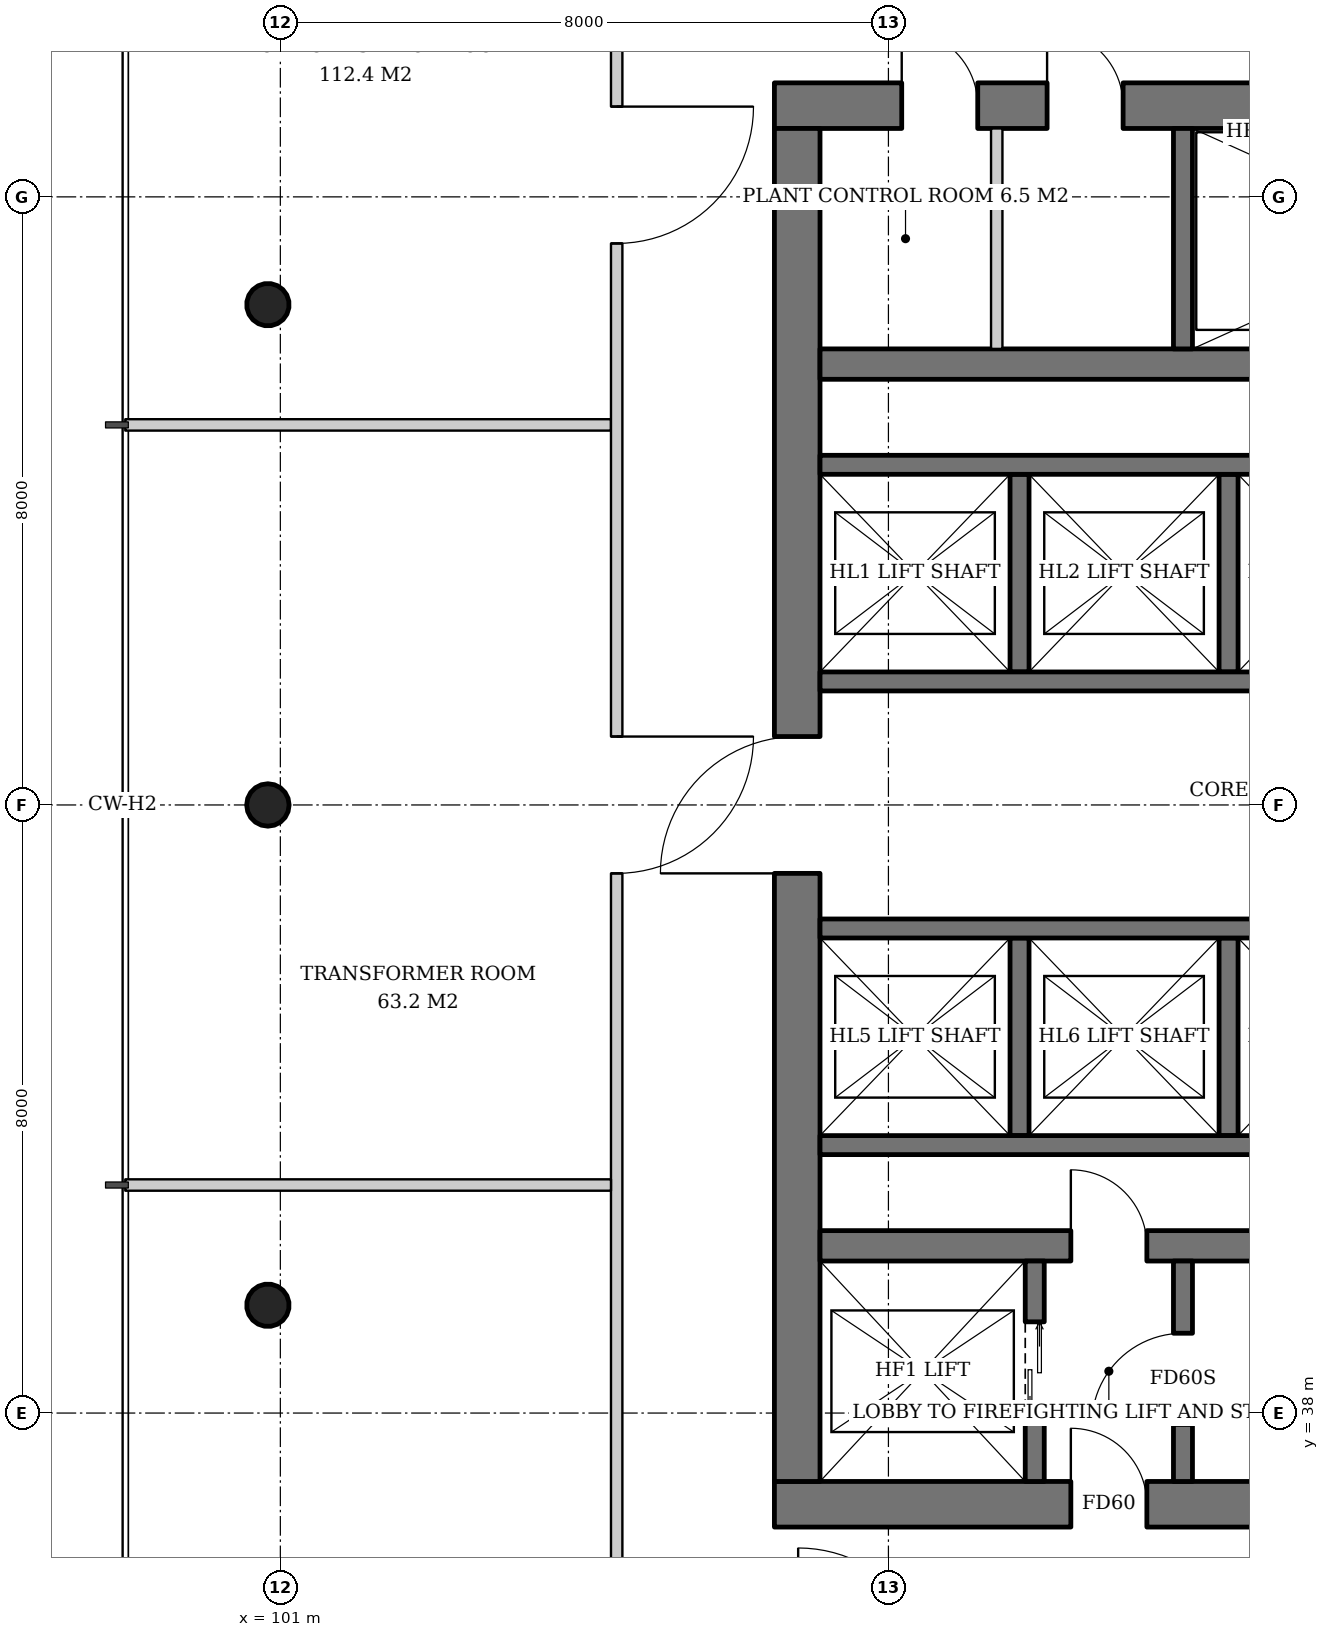
"""IFC4 building model, lengths in metres.
Left out: names, types, materials, properties, quantities, classifications, styles, units other than length and angle.
Written with IfcOpenShell. Run it as: python <this file> out.ifc"""

import sys

from ifc_helpers import new_model, si_unit, direction, frame, frame_2d, origin, origin_2d, place, context, subcontext, project, spatial, rectangle, hollow_circle, extrude, element, fill, save


model = new_model("IFC4")
c1 = context("Model", 3, precision=1e-05, world=origin(), true_north=direction((0.0, 1.0)))
c2 = subcontext(c1, "Body", "Model", "MODEL_VIEW")
j1 = project(units=[si_unit("LENGTHUNIT", "METRE"), si_unit("PLANEANGLEUNIT", "RADIAN")], contexts=[c1])
p1 = place(None, origin())
s1 = spatial("IfcSite", under=j1, at=p1, CompositionType="ELEMENT")
p2 = place(p1, origin())
s2 = spatial("IfcBuilding", under=s1, at=p2, CompositionType="ELEMENT")
p3 = place(p2, frame((0.0, 0.0, 85.6)))
s3 = spatial("IfcBuildingStorey", under=s2, at=p3, CompositionType="ELEMENT", Elevation=85.6)
p4 = place(p3, frame((100.784, 52.608, 0.0), z_axis=(0.04306234503, -0.02149908433, 0.998841040313), x_axis=(0.446680166538, 0.894693706707, 0.0)))
e1 = element("IfcColumn", 1, at=p4, inside=s3, PredefinedType="COLUMN", context=c2, shape_type="SweptSolid", body=[
    extrude(hollow_circle(Radius=0.28, WallThickness=0.02, at=origin_2d()), origin(), (0.0, 0.0, 1.0), 3.804),
])
p5 = place(p3, frame((100.784, 46.0, 0.0), z_axis=(0.043072300418, 0.0, 0.999071957837), x_axis=(0.0, 1.0, 0.0)))
e2 = element("IfcColumn", 2, at=p5, inside=s3, PredefinedType="COLUMN", context=c2, shape_type="SweptSolid", body=[
    extrude(hollow_circle(Radius=0.28, WallThickness=0.02, at=origin_2d()), origin(), (0.0, 0.0, 1.0), 3.803),
])
p6 = place(p3, frame((100.784, 39.392, 0.0), z_axis=(0.04306234503, 0.02149908433, 0.998841040313), x_axis=(-0.446680166538, 0.894693706707, 0.0)))
e3 = element("IfcColumn", 3, at=p6, inside=s3, PredefinedType="COLUMN", context=c2, shape_type="SweptSolid", body=[
    extrude(hollow_circle(Radius=0.28, WallThickness=0.02, at=origin_2d()), origin(), (0.0, 0.0, 1.0), 3.804),
])
p7 = place(p3, frame((107.5, 36.8, 0.0), z_axis=(0.0, 0.0, 1.0), x_axis=(1.0, 0.0, 0.0)))
e4 = element("IfcWall", 4, at=p7, inside=s3, PredefinedType="SHEAR", context=c2, shape_type="SweptSolid", body=[
    extrude(rectangle(XDim=19.0, YDim=0.6, at=frame_2d((9.5, 0.0))), origin(), (0.0, 0.0, 1.0), 3.8),
])
p8 = place(p7, frame((3.9, 0.0, 0.0)))
e5 = element("IfcOpeningElement", 5, at=p8, cuts=e4, PredefinedType="OPENING", context=c2, shape_type="SweptSolid", body=[
    extrude(rectangle(XDim=1.0, YDim=2.1, at=frame_2d((0.5, 1.05))), frame((0.0, 0.31, 0.0), z_axis=(0.0, -1.0, 0.0), x_axis=(1.0, 0.0, 0.0)), (0.0, 0.0, 1.0), 0.62),
])
p9 = place(p7, frame((15.615, 0.0, 0.0)))
e6 = element("IfcOpeningElement", 6, at=p9, cuts=e4, PredefinedType="OPENING", context=c2, shape_type="SweptSolid", body=[
    extrude(rectangle(XDim=1.0, YDim=2.1, at=frame_2d((0.5, 1.05))), frame((0.0, 0.31, 0.0), z_axis=(0.0, -1.0, 0.0), x_axis=(1.0, 0.0, 0.0)), (0.0, 0.0, 1.0), 0.62),
])
p10 = place(p3, frame((107.5, 55.2, 0.0), z_axis=(0.0, 0.0, 1.0), x_axis=(1.0, 0.0, 0.0)))
e7 = element("IfcWall", 7, at=p10, inside=s3, PredefinedType="SHEAR", context=c2, shape_type="SweptSolid", body=[
    extrude(rectangle(XDim=19.0, YDim=0.6, at=frame_2d((9.5, 0.0))), origin(), (0.0, 0.0, 1.0), 3.8),
])
p11 = place(p10, frame((14.14, 0.0, 0.0)))
e8 = element("IfcOpeningElement", 8, at=p11, cuts=e7, PredefinedType="OPENING", context=c2, shape_type="SweptSolid", body=[
    extrude(rectangle(XDim=1.0, YDim=2.1, at=frame_2d((0.5, 1.05))), frame((0.0, 0.31, 0.0), z_axis=(0.0, -1.0, 0.0), x_axis=(1.0, 0.0, 0.0)), (0.0, 0.0, 1.0), 0.62),
])
p12 = place(p10, frame((1.675, 0.0, 0.0)))
e9 = element("IfcOpeningElement", 9, at=p12, cuts=e7, PredefinedType="OPENING", context=c2, shape_type="SweptSolid", body=[
    extrude(rectangle(XDim=1.0, YDim=2.1, at=frame_2d((0.5, 1.05))), frame((0.0, 0.31, 0.0), z_axis=(0.0, -1.0, 0.0), x_axis=(1.0, 0.0, 0.0)), (0.0, 0.0, 1.0), 0.62),
])
p13 = place(p10, frame((3.587, 0.0, 0.0)))
e10 = element("IfcOpeningElement", 10, at=p13, cuts=e7, PredefinedType="OPENING", context=c2, shape_type="SweptSolid", body=[
    extrude(rectangle(XDim=1.0, YDim=2.1, at=frame_2d((0.5, 1.05))), frame((0.0, 0.31, 0.0), z_axis=(0.0, -1.0, 0.0), x_axis=(1.0, 0.0, 0.0)), (0.0, 0.0, 1.0), 0.62),
])
p14 = place(p3, frame((107.8, 37.1, 0.0), z_axis=(0.0, 0.0, 1.0), x_axis=(0.0, 1.0, 0.0)))
e11 = element("IfcWall", 11, at=p14, inside=s3, PredefinedType="SHEAR", context=c2, shape_type="SweptSolid", body=[
    extrude(rectangle(XDim=17.8, YDim=0.6, at=frame_2d((8.9, 0.0))), origin(), (0.0, 0.0, 1.0), 3.8),
])
p15 = place(p14, frame((8.0, 0.0, 0.0)))
e12 = element("IfcOpeningElement", 12, at=p15, cuts=e11, PredefinedType="OPENING", context=c2, shape_type="SweptSolid", body=[
    extrude(rectangle(XDim=1.8, YDim=2.4, at=frame_2d((0.9, 1.2))), frame((0.0, 0.31, 0.0), z_axis=(0.0, -1.0, 0.0), x_axis=(1.0, 0.0, 0.0)), (0.0, 0.0, 1.0), 0.62),
])
p16 = place(p3, frame((108.1, 40.2, 0.0), z_axis=(0.0, 0.0, 1.0), x_axis=(1.0, 0.0, 0.0)))
e13 = element("IfcWall", 13, at=p16, inside=s3, PredefinedType="SHEAR", context=c2, shape_type="SweptSolid", body=[
    extrude(rectangle(XDim=17.8, YDim=0.4, at=frame_2d((8.9, 0.0))), origin(), (0.0, 0.0, 1.0), 3.8),
])
p17 = place(p16, frame((3.3, 0.0, 0.0)))
e14 = element("IfcOpeningElement", 14, at=p17, cuts=e13, PredefinedType="OPENING", context=c2, shape_type="SweptSolid", body=[
    extrude(rectangle(XDim=1.0, YDim=2.1, at=frame_2d((0.5, 1.05))), frame((0.0, 0.21, 0.0), z_axis=(0.0, -1.0, 0.0), x_axis=(1.0, 0.0, 0.0)), (0.0, 0.0, 1.0), 0.42),
])
p18 = place(p3, frame((108.1, 51.8, 0.0), z_axis=(0.0, 0.0, 1.0), x_axis=(1.0, 0.0, 0.0)))
e15 = element("IfcWall", 15, at=p18, inside=s3, PredefinedType="SHEAR", context=c2, shape_type="SweptSolid", body=[
    extrude(rectangle(XDim=17.8, YDim=0.4, at=frame_2d((8.9, 0.0))), origin(), (0.0, 0.0, 1.0), 3.8),
])
p19 = place(p18, frame((11.33, 0.0, 0.0)))
e16 = element("IfcOpeningElement", 16, at=p19, cuts=e15, PredefinedType="OPENING", context=c2, shape_type="SweptSolid", body=[
    extrude(rectangle(XDim=1.0, YDim=2.1, at=frame_2d((0.5, 1.05))), frame((0.0, 0.21, 0.0), z_axis=(0.0, -1.0, 0.0), x_axis=(1.0, 0.0, 0.0)), (0.0, 0.0, 1.0), 0.42),
])
p20 = place(p3, frame((110.925, 37.1, 0.0), z_axis=(0.0, 0.0, 1.0), x_axis=(0.0, 1.0, 0.0)))
e17 = element("IfcWall", 17, at=p20, inside=s3, PredefinedType="SHEAR", context=c2, shape_type="SweptSolid", body=[
    extrude(rectangle(XDim=2.9, YDim=0.25, at=frame_2d((1.45, 0.0))), origin(), (0.0, 0.0, 1.0), 3.8),
])
p21 = place(p20, frame((0.8, 0.0, 0.0)))
e18 = element("IfcOpeningElement", 18, at=p21, cuts=e17, PredefinedType="OPENING", context=c2, shape_type="SweptSolid", body=[
    extrude(rectangle(XDim=1.3, YDim=2.2, at=frame_2d((0.65, 1.1))), frame((0.0, 0.135, 0.0), z_axis=(0.0, -1.0, 0.0), x_axis=(1.0, 0.0, 0.0)), (0.0, 0.0, 1.0), 0.27),
])
p22 = place(p3, frame((112.875, 37.1, 0.0), z_axis=(0.0, 0.0, 1.0), x_axis=(0.0, 1.0, 0.0)))
e19 = element("IfcWall", 19, at=p22, inside=s3, PredefinedType="SHEAR", context=c2, shape_type="SweptSolid", body=[
    extrude(rectangle(XDim=2.9, YDim=0.25, at=frame_2d((1.45, 0.0))), origin(), (0.0, 0.0, 1.0), 3.8),
])
p23 = place(p22, frame((0.75, 0.0, 0.0)))
e20 = element("IfcOpeningElement", 20, at=p23, cuts=e19, PredefinedType="OPENING", context=c2, shape_type="SweptSolid", body=[
    extrude(rectangle(XDim=1.2, YDim=2.1, at=frame_2d((0.6, 1.05))), frame((0.0, 0.135, 0.0), z_axis=(0.0, -1.0, 0.0), x_axis=(1.0, 0.0, 0.0)), (0.0, 0.0, 1.0), 0.27),
])
p24 = place(p3, frame((112.875, 52.0, 0.0), z_axis=(0.0, 0.0, 1.0), x_axis=(0.0, 1.0, 0.0)))
e21 = element("IfcWall", 21, at=p24, inside=s3, PredefinedType="SHEAR", context=c2, shape_type="SweptSolid", body=[
    extrude(rectangle(XDim=2.9, YDim=0.25, at=frame_2d((1.45, 0.0))), origin(), (0.0, 0.0, 1.0), 3.8),
])
for number, where, z_axis, x_axis in (
    (22, (110.725, 47.75, 0.0), (0.0, 0.0, 1.0), (0.0, 1.0, 0.0)),
    (23, (113.475, 47.75, 0.0), (0.0, 0.0, 1.0), (0.0, 1.0, 0.0)),
):
    element("IfcWall", number, at=place(p3, frame(where, z_axis=z_axis, x_axis=x_axis)), inside=s3, PredefinedType="SHEAR", context=c2, shape_type="SweptSolid", body=[
        extrude(rectangle(XDim=2.6, YDim=0.25, at=frame_2d((1.3, 0.0))), origin(), (0.0, 0.0, 1.0), 3.8),
    ])
p25 = place(p3, frame((108.1, 50.475, 0.0), z_axis=(0.0, 0.0, 1.0), x_axis=(1.0, 0.0, 0.0)))
e24 = element("IfcWall", 24, at=p25, inside=s3, PredefinedType="SHEAR", context=c2, shape_type="SweptSolid", body=[
    extrude(rectangle(XDim=11.0, YDim=0.25, at=frame_2d((5.5, 0.0))), origin(), (0.0, 0.0, 1.0), 3.8),
])
p26 = place(p3, frame((108.1, 47.625, 0.0), z_axis=(0.0, 0.0, 1.0), x_axis=(1.0, 0.0, 0.0)))
e25 = element("IfcWall", 25, at=p26, inside=s3, PredefinedType="SHEAR", context=c2, shape_type="SweptSolid", body=[
    extrude(rectangle(XDim=12.83, YDim=0.25, at=frame_2d((6.415, 0.0))), origin(), (0.0, 0.0, 1.0), 3.8),
])
p27 = place(p26, frame((11.415, 0.0, 0.0)))
e26 = element("IfcOpeningElement", 26, at=p27, cuts=e25, PredefinedType="OPENING", context=c2, shape_type="SweptSolid", body=[
    extrude(rectangle(XDim=1.0, YDim=2.1, at=frame_2d((0.5, 1.05))), frame((0.0, 0.135, 0.0), z_axis=(0.0, -1.0, 0.0), x_axis=(1.0, 0.0, 0.0)), (0.0, 0.0, 1.0), 0.27),
])
for number, where, z_axis, x_axis in (
    (27, (110.725, 44.25, 0.0), (0.0, 0.0, 1.0), (0.0, -1.0, 0.0)),
    (28, (113.475, 44.25, 0.0), (0.0, 0.0, 1.0), (0.0, -1.0, 0.0)),
):
    element("IfcWall", number, at=place(p3, frame(where, z_axis=z_axis, x_axis=x_axis)), inside=s3, PredefinedType="SHEAR", context=c2, shape_type="SweptSolid", body=[
        extrude(rectangle(XDim=2.6, YDim=0.25, at=frame_2d((1.3, 0.0))), origin(), (0.0, 0.0, 1.0), 3.8),
    ])
p28 = place(p3, frame((108.1, 41.525, 0.0), z_axis=(0.0, 0.0, 1.0), x_axis=(1.0, 0.0, 0.0)))
e29 = element("IfcWall", 29, at=p28, inside=s3, PredefinedType="SHEAR", context=c2, shape_type="SweptSolid", body=[
    extrude(rectangle(XDim=11.0, YDim=0.25, at=frame_2d((5.5, 0.0))), origin(), (0.0, 0.0, 1.0), 3.8),
])
p29 = place(p3, frame((108.1, 44.375, 0.0), z_axis=(0.0, 0.0, 1.0), x_axis=(1.0, 0.0, 0.0)))
e30 = element("IfcWall", 30, at=p29, inside=s3, PredefinedType="SHEAR", context=c2, shape_type="SweptSolid", body=[
    extrude(rectangle(XDim=12.83, YDim=0.25, at=frame_2d((6.415, 0.0))), origin(), (0.0, 0.0, 1.0), 3.8),
])
p30 = place(p29, frame((9.0, 0.0, 0.0)))
e31 = element("IfcOpeningElement", 31, at=p30, cuts=e30, PredefinedType="OPENING", context=c2, shape_type="SweptSolid", body=[
    extrude(rectangle(XDim=1.0, YDim=2.1, at=frame_2d((0.5, 1.05))), frame((0.0, 0.135, 0.0), z_axis=(0.0, -1.0, 0.0), x_axis=(1.0, 0.0, 0.0)), (0.0, 0.0, 1.0), 0.27),
])
p31 = place(p29, frame((11.415, 0.0, 0.0)))
e32 = element("IfcOpeningElement", 32, at=p31, cuts=e30, PredefinedType="OPENING", context=c2, shape_type="SweptSolid", body=[
    extrude(rectangle(XDim=1.0, YDim=2.1, at=frame_2d((0.5, 1.05))), frame((0.0, 0.135, 0.0), z_axis=(0.0, -1.0, 0.0), x_axis=(1.0, 0.0, 0.0)), (0.0, 0.0, 1.0), 0.27),
])
p32 = place(p3, frame((110.425, 52.0, 0.0), z_axis=(0.0, 0.0, 1.0), x_axis=(0.0, 1.0, 0.0)))
e33 = element("IfcWall", 33, at=p32, inside=s3, PredefinedType="SOLIDWALL", context=c2, shape_type="SweptSolid", body=[
    extrude(rectangle(XDim=2.9, YDim=0.15, at=frame_2d((1.45, 0.0))), origin(), (0.0, 0.0, 1.0), 3.6),
])
p33 = place(p3, frame((105.35, 51.0, 0.0), z_axis=(0.0, 0.0, 1.0), x_axis=(-1.0, 0.0, 0.0)))
e34 = element("IfcWall", 34, at=p33, inside=s3, PredefinedType="SOLIDWALL", context=c2, shape_type="SweptSolid", body=[
    extrude(rectangle(XDim=6.39, YDim=0.15, at=frame_2d((3.195, 0.0))), origin(), (0.0, 0.0, 1.0), 3.0),
])
p34 = place(p3, frame((105.425, 57.65, 0.0), z_axis=(0.0, 0.0, 1.0), x_axis=(0.0, -1.0, 0.0)))
e35 = element("IfcWall", 35, at=p34, inside=s3, PredefinedType="SOLIDWALL", context=c2, shape_type="SweptSolid", body=[
    extrude(rectangle(XDim=23.15, YDim=0.15, at=frame_2d((11.575, 0.0))), origin(), (0.0, 0.0, 1.0), 2.9),
])
p35 = place(p34, frame((2.462, 0.0, 0.0)))
e36 = element("IfcOpeningElement", 36, at=p35, cuts=e35, PredefinedType="OPENING", context=c2, shape_type="SweptSolid", body=[
    extrude(rectangle(XDim=1.8, YDim=2.4, at=frame_2d((0.9, 1.2))), frame((0.0, 0.085, 0.0), z_axis=(0.0, -1.0, 0.0), x_axis=(1.0, 0.0, 0.0)), (0.0, 0.0, 1.0), 0.17),
])
p36 = place(p34, frame((10.75, 0.0, 0.0)))
e37 = element("IfcOpeningElement", 37, at=p36, cuts=e35, PredefinedType="OPENING", context=c2, shape_type="SweptSolid", body=[
    extrude(rectangle(XDim=1.8, YDim=2.4, at=frame_2d((0.9, 1.2))), frame((0.0, 0.085, 0.0), z_axis=(0.0, -1.0, 0.0), x_axis=(1.0, 0.0, 0.0)), (0.0, 0.0, 1.0), 0.17),
])
p37 = place(p3, frame((105.35, 41.0, 0.0), z_axis=(0.0, 0.0, 1.0), x_axis=(-1.0, 0.0, 0.0)))
e38 = element("IfcWall", 38, at=p37, inside=s3, PredefinedType="SOLIDWALL", context=c2, shape_type="SweptSolid", body=[
    extrude(rectangle(XDim=6.39, YDim=0.15, at=frame_2d((3.195, 0.0))), origin(), (0.0, 0.0, 1.0), 3.2),
])
p38 = place(p21, origin())
e39 = element("IfcDoor", 39, at=p38, inside=s3, OperationType="DOUBLE_DOOR_SLIDING", PredefinedType="DOOR", context=c2, shape_type="SweptSolid", body=[
    extrude(rectangle(XDim=1.3, YDim=2.2, at=frame_2d((0.65, 1.1))), frame((0.0, 0.025, 0.0), z_axis=(0.0, -1.0, 0.0), x_axis=(1.0, 0.0, 0.0)), (0.0, 0.0, 1.0), 0.05),
])
fill(e18, e39)
p39 = place(p23, origin())
e40 = element("IfcDoor", 40, at=p39, inside=s3, OperationType="SINGLE_SWING_LEFT", PredefinedType="DOOR", context=c2, shape_type="SweptSolid", body=[
    extrude(rectangle(XDim=1.2, YDim=2.1, at=frame_2d((0.6, 1.05))), frame((0.0, 0.025, 0.0), z_axis=(0.0, -1.0, 0.0), x_axis=(1.0, 0.0, 0.0)), (0.0, 0.0, 1.0), 0.05),
])
fill(e20, e40)
p40 = place(p8, origin())
e41 = element("IfcDoor", 41, at=p40, inside=s3, OperationType="SINGLE_SWING_LEFT", PredefinedType="DOOR", context=c2, shape_type="SweptSolid", body=[
    extrude(rectangle(XDim=1.0, YDim=2.1, at=frame_2d((0.5, 1.05))), frame((0.0, 0.025, 0.0), z_axis=(0.0, -1.0, 0.0), x_axis=(1.0, 0.0, 0.0)), (0.0, 0.0, 1.0), 0.05),
])
fill(e5, e41)
p41 = place(p15, origin())
e42 = element("IfcDoor", 42, at=p41, inside=s3, OperationType="DOUBLE_DOOR_SINGLE_SWING", PredefinedType="DOOR", context=c2, shape_type="SweptSolid", body=[
    extrude(rectangle(XDim=1.8, YDim=2.4, at=frame_2d((0.9, 1.2))), frame((0.0, 0.025, 0.0), z_axis=(0.0, -1.0, 0.0), x_axis=(1.0, 0.0, 0.0)), (0.0, 0.0, 1.0), 0.05),
])
fill(e12, e42)
p42 = place(p17, origin())
e43 = element("IfcDoor", 43, at=p42, inside=s3, OperationType="SINGLE_SWING_LEFT", PredefinedType="DOOR", context=c2, shape_type="SweptSolid", body=[
    extrude(rectangle(XDim=1.0, YDim=2.1, at=frame_2d((0.5, 1.05))), frame((0.0, 0.025, 0.0), z_axis=(0.0, -1.0, 0.0), x_axis=(1.0, 0.0, 0.0)), (0.0, 0.0, 1.0), 0.05),
])
fill(e14, e43)
p43 = place(p12, origin())
e44 = element("IfcDoor", 44, at=p43, inside=s3, OperationType="SINGLE_SWING_LEFT", PredefinedType="DOOR", context=c2, shape_type="SweptSolid", body=[
    extrude(rectangle(XDim=1.0, YDim=2.1, at=frame_2d((0.5, 1.05))), frame((0.0, -0.24, 0.0), z_axis=(0.0, -1.0, 0.0), x_axis=(1.0, 0.0, 0.0)), (0.0, 0.0, 1.0), 0.05),
])
fill(e9, e44)
p44 = place(p13, origin())
e45 = element("IfcDoor", 45, at=p44, inside=s3, OperationType="SINGLE_SWING_LEFT", PredefinedType="DOOR", context=c2, shape_type="SweptSolid", body=[
    extrude(rectangle(XDim=1.0, YDim=2.1, at=frame_2d((0.5, 1.05))), frame((0.0, -0.24, 0.0), z_axis=(0.0, -1.0, 0.0), x_axis=(1.0, 0.0, 0.0)), (0.0, 0.0, 1.0), 0.05),
])
fill(e10, e45)
p45 = place(p35, origin())
e46 = element("IfcDoor", 46, at=p45, inside=s3, OperationType="DOUBLE_DOOR_SINGLE_SWING", PredefinedType="DOOR", context=c2, shape_type="SweptSolid", body=[
    extrude(rectangle(XDim=1.8, YDim=2.4, at=frame_2d((0.9, 1.2))), frame((0.0, 0.025, 0.0), z_axis=(0.0, -1.0, 0.0), x_axis=(1.0, 0.0, 0.0)), (0.0, 0.0, 1.0), 0.05),
])
fill(e36, e46)
p46 = place(p36, origin())
e47 = element("IfcDoor", 47, at=p46, inside=s3, OperationType="DOUBLE_DOOR_SINGLE_SWING", PredefinedType="DOOR", context=c2, shape_type="SweptSolid", body=[
    extrude(rectangle(XDim=1.8, YDim=2.4, at=frame_2d((0.9, 1.2))), frame((0.0, 0.025, 0.0), z_axis=(0.0, -1.0, 0.0), x_axis=(1.0, 0.0, 0.0)), (0.0, 0.0, 1.0), 0.05),
])
fill(e37, e47)
save(model, sys.argv[1])
